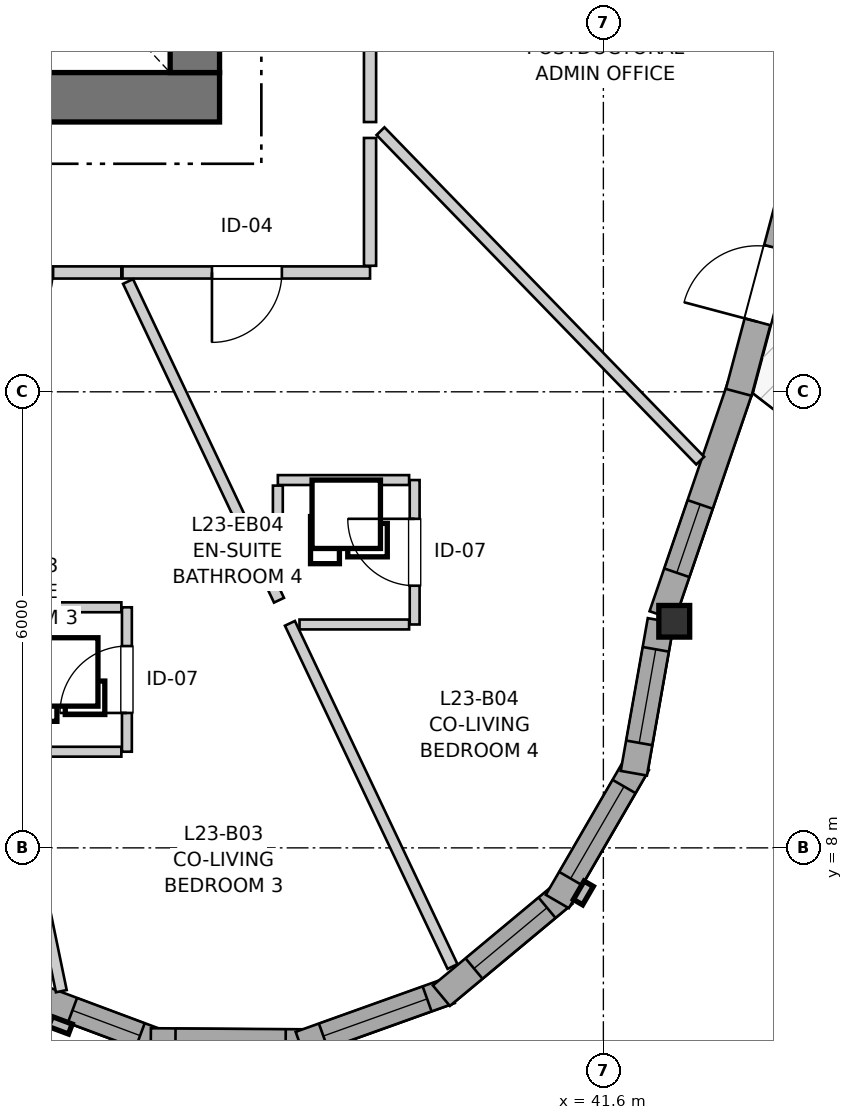
"""IFC4 building model, lengths in metres.
Left out: names, types, materials, properties, quantities, classifications, styles, units other than length and angle.
Written with IfcOpenShell. Run it as: python <this file> out.ifc"""

import sys

from ifc_helpers import new_model, si_unit, direction, frame, frame_2d, origin, origin_2d, place, context, subcontext, project, spatial, rectangle, i_section, extrude, source, transform, mapped, element, fill, save


model = new_model("IFC4")
c1 = context("Model", 3, precision=1e-05, world=origin(), true_north=direction((0.0, 1.0)))
c2 = subcontext(c1, "Body", "Model", "MODEL_VIEW")
j1 = project(units=[si_unit("LENGTHUNIT", "METRE"), si_unit("PLANEANGLEUNIT", "RADIAN")], contexts=[c1])
p1 = place(None, origin())
s1 = spatial("IfcSite", under=j1, at=p1, CompositionType="ELEMENT")
p2 = place(p1, origin())
s2 = spatial("IfcBuilding", under=s1, at=p2, CompositionType="ELEMENT")
p3 = place(p2, frame((0.0, 0.0, 80.0)))
s3 = spatial("IfcBuildingStorey", under=s2, at=p3, CompositionType="ELEMENT", Elevation=80.0)
p4 = place(p3, frame((24.15, 17.875, 0.0), z_axis=(0.0, 0.0, 1.0), x_axis=(1.0, 0.0, 0.0)))
e1 = element("IfcWall", 1, at=p4, inside=s3, PredefinedType="SHEAR", context=c2, shape_type="SweptSolid", body=[
    extrude(rectangle(XDim=12.4, YDim=0.65, at=frame_2d((6.2, 0.0))), origin(), (0.0, 0.0, 1.0), 2.935),
])
p5 = place(p3, frame((36.225, 18.2, 0.0), z_axis=(0.0, 0.0, 1.0), x_axis=(0.0, 1.0, 0.0)))
e2 = element("IfcWall", 2, at=p5, inside=s3, PredefinedType="SHEAR", context=c2, shape_type="SweptSolid", body=[
    extrude(rectangle(XDim=15.6, YDim=0.65, at=frame_2d((7.8, 0.0))), origin(), (0.0, 0.0, 1.0), 2.935),
])
p6 = place(p5, frame((4.25, 0.0, 0.0)))
e3 = element("IfcOpeningElement", 3, at=p6, cuts=e2, PredefinedType="OPENING", context=c2, shape_type="SweptSolid", body=[
    extrude(rectangle(XDim=1.1, YDim=2.15, at=frame_2d((0.55, 1.075))), frame((0.0, 0.335, 0.0), z_axis=(0.0, -1.0, 0.0), x_axis=(1.0, 0.0, 0.0)), (0.0, 0.0, 1.0), 0.67),
])
p7 = place(p5, frame((10.25, 0.0, 0.0)))
e4 = element("IfcOpeningElement", 4, at=p7, cuts=e2, PredefinedType="OPENING", context=c2, shape_type="SweptSolid", body=[
    extrude(rectangle(XDim=1.1, YDim=2.15, at=frame_2d((0.55, 1.075))), frame((0.0, 0.335, 0.0), z_axis=(0.0, -1.0, 0.0), x_axis=(1.0, 0.0, 0.0)), (0.0, 0.0, 1.0), 0.67),
])
m1 = source(origin(), c2, "Body", "SweptSolid", [
    extrude(i_section(OverallWidth=0.406, OverallDepth=0.416, WebThickness=0.027, FlangeThickness=0.044, FilletRadius=0.015, at=origin_2d()), origin(), (0.0, 0.0, 1.0), 2.935),
])
p8 = place(p3, frame((42.532, 10.981, 0.0), z_axis=(0.0, 0.0, 1.0), x_axis=(1.0, 0.0, 0.0)))
e5 = element("IfcColumn", 5, at=p8, inside=s3, PredefinedType="PILASTER", context=c2, shape_type="MappedRepresentation", body=[
    mapped(m1, transform((0.0, 0.0, 0.0), x_axis=(1.0, 0.0, 0.0), y_axis=(0.0, 1.0, 0.0), z_axis=(0.0, 0.0, 1.0), scale=1.0)),
])
p9 = place(p3, frame((34.059, 6.07, 0.0), z_axis=(0.0, 0.0, 1.0), x_axis=(0.936803747811, -0.349855310219, 0.0)))
e6 = element("IfcWall", 6, at=p9, inside=s3, PredefinedType="SOLIDWALL", context=c2, shape_type="SweptSolid", body=[
    extrude(rectangle(XDim=1.836, YDim=0.35, at=frame_2d((0.918, 0.0))), origin(), (0.0, 0.0, 1.0), 2.465),
])
p10 = place(p9, frame((0.593, 0.0, 0.82)))
e7 = element("IfcOpeningElement", 7, at=p10, cuts=e6, PredefinedType="OPENING", context=c2, shape_type="SweptSolid", body=[
    extrude(rectangle(XDim=0.95, YDim=1.35, at=frame_2d((0.475, 0.675))), frame((0.0, 0.185, 0.0), z_axis=(0.0, -1.0, 0.0), x_axis=(1.0, 0.0, 0.0)), (0.0, 0.0, 1.0), 0.37),
])
p11 = place(p3, frame((35.646, 5.452, 0.0), z_axis=(0.0, 0.0, 1.0), x_axis=(0.999976451414, -0.006862697526, 0.0)))
e8 = element("IfcWall", 8, at=p11, inside=s3, PredefinedType="SOLIDWALL", context=c2, shape_type="SweptSolid", body=[
    extrude(rectangle(XDim=2.099, YDim=0.35, at=frame_2d((1.049, 0.0))), origin(), (0.0, 0.0, 1.0), 2.465),
])
p12 = place(p11, frame((0.324, 0.0, 0.82)))
e9 = element("IfcOpeningElement", 9, at=p12, cuts=e8, PredefinedType="OPENING", context=c2, shape_type="SweptSolid", body=[
    extrude(rectangle(XDim=1.45, YDim=1.25, at=frame_2d((0.725, 0.625))), frame((0.0, 0.185, 0.0), z_axis=(0.0, -1.0, 0.0), x_axis=(1.0, 0.0, 0.0)), (0.0, 0.0, 1.0), 0.37),
])
p13 = place(p3, frame((37.61, 5.415, 0.0), z_axis=(0.0, 0.0, 1.0), x_axis=(0.941473186867, 0.33708787936, 0.0)))
e10 = element("IfcWall", 10, at=p13, inside=s3, PredefinedType="SOLIDWALL", context=c2, shape_type="SweptSolid", body=[
    extrude(rectangle(XDim=2.099, YDim=0.35, at=frame_2d((1.049, 0.0))), origin(), (0.0, 0.0, 1.0), 2.465),
])
p14 = place(p13, frame((0.324, 0.0, 0.82)))
e11 = element("IfcOpeningElement", 11, at=p14, cuts=e10, PredefinedType="OPENING", context=c2, shape_type="SweptSolid", body=[
    extrude(rectangle(XDim=1.45, YDim=1.25, at=frame_2d((0.725, 0.625))), frame((0.0, 0.185, 0.0), z_axis=(0.0, -1.0, 0.0), x_axis=(1.0, 0.0, 0.0)), (0.0, 0.0, 1.0), 0.37),
])
p15 = place(p3, frame((39.469, 6.055, 0.0), z_axis=(0.0, 0.0, 1.0), x_axis=(0.768497696041, 0.639852554249, 0.0)))
e12 = element("IfcWall", 12, at=p15, inside=s3, PredefinedType="SOLIDWALL", context=c2, shape_type="SweptSolid", body=[
    extrude(rectangle(XDim=2.099, YDim=0.35, at=frame_2d((1.049, 0.0))), origin(), (0.0, 0.0, 1.0), 2.465),
])
p16 = place(p15, frame((0.559, 0.0, 0.82)))
e13 = element("IfcOpeningElement", 13, at=p16, cuts=e12, PredefinedType="OPENING", context=c2, shape_type="SweptSolid", body=[
    extrude(rectangle(XDim=1.25, YDim=1.35, at=frame_2d((0.625, 0.675))), frame((0.0, 0.185, 0.0), z_axis=(0.0, -1.0, 0.0), x_axis=(1.0, 0.0, 0.0)), (0.0, 0.0, 1.0), 0.37),
])
p17 = place(p3, frame((40.994, 7.294, 0.0), z_axis=(0.0, 0.0, 1.0), x_axis=(0.501902596059, 0.864924149315, 0.0)))
e14 = element("IfcWall", 14, at=p17, inside=s3, PredefinedType="SOLIDWALL", context=c2, shape_type="SweptSolid", body=[
    extrude(rectangle(XDim=2.099, YDim=0.35, at=frame_2d((1.049, 0.0))), origin(), (0.0, 0.0, 1.0), 2.465),
])
p18 = place(p17, frame((0.35, 0.0, 0.82)))
e15 = element("IfcOpeningElement", 15, at=p18, cuts=e14, PredefinedType="OPENING", context=c2, shape_type="SweptSolid", body=[
    extrude(rectangle(XDim=1.4, YDim=1.35, at=frame_2d((0.7, 0.675))), frame((0.0, 0.185, 0.0), z_axis=(0.0, -1.0, 0.0), x_axis=(1.0, 0.0, 0.0)), (0.0, 0.0, 1.0), 0.37),
])
p19 = place(p3, frame((42.001, 8.982, 0.0), z_axis=(0.0, 0.0, 1.0), x_axis=(0.174419977077, 0.984671352075, 0.0)))
e16 = element("IfcWall", 16, at=p19, inside=s3, PredefinedType="SOLIDWALL", context=c2, shape_type="SweptSolid", body=[
    extrude(rectangle(XDim=2.041, YDim=0.35, at=frame_2d((1.021, 0.0))), origin(), (0.0, 0.0, 1.0), 2.465),
])
p20 = place(p19, frame((0.406, 0.0, 0.82)))
e17 = element("IfcOpeningElement", 17, at=p20, cuts=e16, PredefinedType="OPENING", context=c2, shape_type="SweptSolid", body=[
    extrude(rectangle(XDim=1.25, YDim=1.35, at=frame_2d((0.625, 0.675))), frame((0.0, 0.185, 0.0), z_axis=(0.0, -1.0, 0.0), x_axis=(1.0, 0.0, 0.0)), (0.0, 0.0, 1.0), 0.37),
])
p21 = place(p3, frame((42.373, 11.057, 0.0), z_axis=(0.0, 0.0, 1.0), x_axis=(0.323628226775, 0.946184321808, 0.0)))
e18 = element("IfcWall", 18, at=p21, inside=s3, PredefinedType="SOLIDWALL", context=c2, shape_type="SweptSolid", body=[
    extrude(rectangle(XDim=3.193, YDim=0.35, at=frame_2d((1.596, 0.0))), origin(), (0.0, 0.0, 1.0), 2.465),
])
p22 = place(p21, frame((0.595, 0.0, 0.82)))
e19 = element("IfcOpeningElement", 19, at=p22, cuts=e18, PredefinedType="OPENING", context=c2, shape_type="SweptSolid", body=[
    extrude(rectangle(XDim=0.95, YDim=1.35, at=frame_2d((0.475, 0.675))), frame((0.0, 0.185, 0.0), z_axis=(0.0, -1.0, 0.0), x_axis=(1.0, 0.0, 0.0)), (0.0, 0.0, 1.0), 0.37),
])
p23 = place(p3, frame((43.381, 13.993, 0.0), z_axis=(0.0, 0.0, 1.0), x_axis=(0.257079998736, 0.966390125286, 0.0)))
e20 = element("IfcWall", 20, at=p23, inside=s3, PredefinedType="SOLIDWALL", context=c2, shape_type="SweptSolid", body=[
    extrude(rectangle(XDim=2.921, YDim=0.35, at=frame_2d((1.46, 0.0))), origin(), (0.0, 0.0, 1.0), 2.465),
])
p24 = place(p23, frame((0.961, 0.0, 0.0)))
e21 = element("IfcOpeningElement", 21, at=p24, cuts=e20, PredefinedType="OPENING", context=c2, shape_type="SweptSolid", body=[
    extrude(rectangle(XDim=1.0, YDim=2.1, at=frame_2d((0.5, 1.05))), frame((0.0, 0.185, 0.0), z_axis=(0.0, -1.0, 0.0), x_axis=(1.0, 0.0, 0.0)), (0.0, 0.0, 1.0), 0.37),
])
p25 = place(p3, frame((38.53, 23.392, 0.0), z_axis=(0.0, 0.0, 1.0), x_axis=(0.0, -1.0, 0.0)))
e22 = element("IfcWall", 22, at=p25, inside=s3, PredefinedType="PARTITIONING", context=c2, shape_type="SweptSolid", body=[
    extrude(rectangle(XDim=5.843, YDim=0.16, at=frame_2d((2.921, 0.0))), origin(), (0.0, 0.0, 1.0), 2.935),
])
p26 = place(p25, frame((2.438, 0.0, 0.0)))
e23 = element("IfcOpeningElement", 23, at=p26, cuts=e22, PredefinedType="OPENING", context=c2, shape_type="SweptSolid", body=[
    extrude(rectangle(XDim=0.96, YDim=2.1, at=frame_2d((0.48, 1.05))), frame((0.0, 0.09, 0.0), z_axis=(0.0, -1.0, 0.0), x_axis=(1.0, 0.0, 0.0)), (0.0, 0.0, 1.0), 0.18),
])
p27 = place(p3, frame((38.53, 15.57, 0.0), z_axis=(0.0, 0.0, 1.0), x_axis=(-1.0, 0.0, 0.0)))
e24 = element("IfcWall", 24, at=p27, inside=s3, PredefinedType="PARTITIONING", context=c2, shape_type="SweptSolid", body=[
    extrude(rectangle(XDim=3.257, YDim=0.16, at=frame_2d((1.628, 0.0))), origin(), (0.0, 0.0, 1.0), 2.935),
])
p28 = place(p27, frame((1.16, 0.0, 0.0)))
e25 = element("IfcOpeningElement", 25, at=p28, cuts=e24, PredefinedType="OPENING", context=c2, shape_type="SweptSolid", body=[
    extrude(rectangle(XDim=0.92, YDim=2.1, at=frame_2d((0.46, 1.05))), frame((0.0, 0.09, 0.0), z_axis=(0.0, -1.0, 0.0), x_axis=(1.0, 0.0, 0.0)), (0.0, 0.0, 1.0), 0.18),
])
p29 = place(p3, frame((35.258, 15.57, 0.0), z_axis=(0.0, 0.0, 1.0), x_axis=(-1.0, 0.0, 0.0)))
e26 = element("IfcWall", 26, at=p29, inside=s3, PredefinedType="PARTITIONING", context=c2, shape_type="SweptSolid", body=[
    extrude(rectangle(XDim=2.718, YDim=0.16, at=frame_2d((1.359, 0.0))), origin(), (0.0, 0.0, 1.0), 2.935),
])
p30 = place(p29, frame((0.898, 0.0, 0.0)))
e27 = element("IfcOpeningElement", 27, at=p30, cuts=e26, PredefinedType="OPENING", context=c2, shape_type="SweptSolid", body=[
    extrude(rectangle(XDim=0.92, YDim=2.1, at=frame_2d((0.46, 1.05))), frame((0.0, 0.09, 0.0), z_axis=(0.0, -1.0, 0.0), x_axis=(1.0, 0.0, 0.0)), (0.0, 0.0, 1.0), 0.18),
])
p31 = place(p3, frame((39.117, 10.939, 0.0), z_axis=(0.0, 0.0, 1.0), x_axis=(0.0, 1.0, 0.0)))
e28 = element("IfcWall", 28, at=p31, inside=s3, PredefinedType="PARTITIONING", context=c2, shape_type="SweptSolid", body=[
    extrude(rectangle(XDim=1.9, YDim=0.13, at=frame_2d((0.95, 0.0))), origin(), (0.0, 0.0, 1.0), 2.935),
])
p32 = place(p31, frame((0.51, 0.0, 0.0)))
e29 = element("IfcOpeningElement", 29, at=p32, cuts=e28, PredefinedType="OPENING", context=c2, shape_type="SweptSolid", body=[
    extrude(rectangle(XDim=0.88, YDim=2.05, at=frame_2d((0.44, 1.025))), frame((0.0, 0.075, 0.0), z_axis=(0.0, -1.0, 0.0), x_axis=(1.0, 0.0, 0.0)), (0.0, 0.0, 1.0), 0.15),
])
p33 = place(p3, frame((35.331, 9.265, 0.0), z_axis=(0.0, 0.0, 1.0), x_axis=(0.0, 1.0, 0.0)))
e30 = element("IfcWall", 30, at=p33, inside=s3, PredefinedType="PARTITIONING", context=c2, shape_type="SweptSolid", body=[
    extrude(rectangle(XDim=1.9, YDim=0.13, at=frame_2d((0.95, 0.0))), origin(), (0.0, 0.0, 1.0), 2.935),
])
p34 = place(p33, frame((0.51, 0.0, 0.0)))
e31 = element("IfcOpeningElement", 31, at=p34, cuts=e30, PredefinedType="OPENING", context=c2, shape_type="SweptSolid", body=[
    extrude(rectangle(XDim=0.88, YDim=2.05, at=frame_2d((0.44, 1.025))), frame((0.0, 0.075, 0.0), z_axis=(0.0, -1.0, 0.0), x_axis=(1.0, 0.0, 0.0)), (0.0, 0.0, 1.0), 0.15),
])
p35 = place(p3, frame((38.667, 17.429, 0.0), z_axis=(0.0, 0.0, 1.0), x_axis=(0.696417222112, -0.717637131666, 0.0)))
e32 = element("IfcWall", 32, at=p35, inside=s3, PredefinedType="PARTITIONING", context=c2, shape_type="SweptSolid", body=[
    extrude(rectangle(XDim=6.04, YDim=0.145, at=frame_2d((3.02, 0.0))), origin(), (0.0, 0.0, 1.0), 2.935),
])
p36 = place(p3, frame((37.476, 10.954, 0.0), z_axis=(0.0, 0.0, 1.0), x_axis=(0.428094746621, -0.903733859007, 0.0)))
e33 = element("IfcWall", 33, at=p36, inside=s3, PredefinedType="PARTITIONING", context=c2, shape_type="SweptSolid", body=[
    extrude(rectangle(XDim=4.996, YDim=0.145, at=frame_2d((2.498, 0.0))), origin(), (0.0, 0.0, 1.0), 2.935),
])
p37 = place(p3, frame((35.346, 15.452, 0.0), z_axis=(0.0, 0.0, 1.0), x_axis=(0.428023015228, -0.903767834366, 0.0)))
e34 = element("IfcWall", 34, at=p37, inside=s3, PredefinedType="PARTITIONING", context=c2, shape_type="SweptSolid", body=[
    extrude(rectangle(XDim=4.64, YDim=0.145, at=frame_2d((2.32, 0.0))), origin(), (0.0, 0.0, 1.0), 2.935),
])
p38 = place(p3, frame((33.813, 9.28, 0.0), z_axis=(0.0, 0.0, 1.0), x_axis=(0.202648062782, -0.979251633979, 0.0)))
e35 = element("IfcWall", 35, at=p38, inside=s3, PredefinedType="PARTITIONING", context=c2, shape_type="SweptSolid", body=[
    extrude(rectangle(XDim=3.232, YDim=0.145, at=frame_2d((1.616, 0.0))), origin(), (0.0, 0.0, 1.0), 2.935),
])
p39 = place(p3, frame((38.53, 15.658, 0.0), z_axis=(0.0, 0.0, 1.0), x_axis=(0.0, 1.0, 0.0)))
e36 = element("IfcWall", 36, at=p39, inside=s3, PredefinedType="PARTITIONING", context=c2, shape_type="SweptSolid", body=[
    extrude(rectangle(XDim=1.682, YDim=0.16, at=frame_2d((0.841, 0.0))), origin(), (0.0, 0.0, 1.0), 2.935),
])
p40 = place(p3, frame((33.626, 11.165, 0.0), z_axis=(0.0, 0.0, 1.0), x_axis=(1.0, 0.0, 0.0)))
e37 = element("IfcWall", 37, at=p40, inside=s3, PredefinedType="PARTITIONING", context=c2, shape_type="SweptSolid", body=[
    extrude(rectangle(XDim=1.632, YDim=0.13, at=frame_2d((0.816, 0.0))), origin(), (0.0, 0.0, 1.0), 2.935),
])
p41 = place(p3, frame((37.317, 12.839, 0.0), z_axis=(0.0, 0.0, 1.0), x_axis=(1.0, 0.0, 0.0)))
e38 = element("IfcWall", 38, at=p41, inside=s3, PredefinedType="PARTITIONING", context=c2, shape_type="SweptSolid", body=[
    extrude(rectangle(XDim=1.727, YDim=0.13, at=frame_2d((0.864, 0.0))), origin(), (0.0, 0.0, 1.0), 2.935),
])
p42 = place(p3, frame((37.602, 10.939, 0.0), z_axis=(0.0, 0.0, 1.0), x_axis=(1.0, 0.0, 0.0)))
e39 = element("IfcWall", 39, at=p42, inside=s3, PredefinedType="PARTITIONING", context=c2, shape_type="SweptSolid", body=[
    extrude(rectangle(XDim=1.442, YDim=0.13, at=frame_2d((0.721, 0.0))), origin(), (0.0, 0.0, 1.0), 2.935),
])
p43 = place(p3, frame((37.317, 11.53, 0.0), z_axis=(0.0, 0.0, 1.0), x_axis=(0.0, 1.0, 0.0)))
e40 = element("IfcWall", 40, at=p43, inside=s3, PredefinedType="PARTITIONING", context=c2, shape_type="SweptSolid", body=[
    extrude(rectangle(XDim=1.236, YDim=0.13, at=frame_2d((0.618, 0.0))), origin(), (0.0, 0.0, 1.0), 2.935),
])
p44 = place(p3, frame((33.912, 9.265, 0.0), z_axis=(0.0, 0.0, 1.0), x_axis=(1.0, 0.0, 0.0)))
e41 = element("IfcWall", 41, at=p44, inside=s3, PredefinedType="PARTITIONING", context=c2, shape_type="SweptSolid", body=[
    extrude(rectangle(XDim=1.346, YDim=0.13, at=frame_2d((0.673, 0.0))), origin(), (0.0, 0.0, 1.0), 2.935),
])
m2 = source(origin(), c2, "Body", "SweptSolid", [
    extrude(rectangle(XDim=0.95, YDim=1.35, at=frame_2d((0.475, 0.675))), frame((0.0, 0.03, 0.0), z_axis=(0.0, -1.0, 0.0), x_axis=(1.0, 0.0, 0.0)), (0.0, 0.0, 1.0), 0.06),
])
p45 = place(p10, origin())
e42 = element("IfcWindow", 42, at=p45, inside=s3, PartitioningType="SINGLE_PANEL", PredefinedType="WINDOW", context=c2, shape_type="MappedRepresentation", body=[
    mapped(m2, transform((0.0, 0.0, 0.0), x_axis=(1.0, 0.0, 0.0), y_axis=(0.0, 1.0, 0.0), z_axis=(0.0, 0.0, 1.0), scale=1.0)),
])
fill(e7, e42)
m3 = source(origin(), c2, "Body", "SweptSolid", [
    extrude(rectangle(XDim=1.45, YDim=1.25, at=frame_2d((0.725, 0.625))), frame((0.0, 0.03, 0.0), z_axis=(0.0, -1.0, 0.0), x_axis=(1.0, 0.0, 0.0)), (0.0, 0.0, 1.0), 0.06),
])
p46 = place(p12, origin())
e43 = element("IfcWindow", 43, at=p46, inside=s3, PartitioningType="SINGLE_PANEL", PredefinedType="WINDOW", context=c2, shape_type="MappedRepresentation", body=[
    mapped(m3, transform((0.0, 0.0, 0.0), x_axis=(1.0, 0.0, 0.0), y_axis=(0.0, 1.0, 0.0), z_axis=(0.0, 0.0, 1.0), scale=1.0)),
])
fill(e9, e43)
p47 = place(p14, origin())
e44 = element("IfcWindow", 44, at=p47, inside=s3, PartitioningType="SINGLE_PANEL", PredefinedType="WINDOW", context=c2, shape_type="MappedRepresentation", body=[
    mapped(m3, transform((0.0, 0.0, 0.0), x_axis=(1.0, 0.0, 0.0), y_axis=(0.0, 1.0, 0.0), z_axis=(0.0, 0.0, 1.0), scale=1.0)),
])
fill(e11, e44)
m4 = source(origin(), c2, "Body", "SweptSolid", [
    extrude(rectangle(XDim=1.25, YDim=1.35, at=frame_2d((0.625, 0.675))), frame((0.0, 0.03, 0.0), z_axis=(0.0, -1.0, 0.0), x_axis=(1.0, 0.0, 0.0)), (0.0, 0.0, 1.0), 0.06),
])
p48 = place(p16, origin())
e45 = element("IfcWindow", 45, at=p48, inside=s3, PartitioningType="SINGLE_PANEL", PredefinedType="WINDOW", context=c2, shape_type="MappedRepresentation", body=[
    mapped(m4, transform((0.0, 0.0, 0.0), x_axis=(1.0, 0.0, 0.0), y_axis=(0.0, 1.0, 0.0), z_axis=(0.0, 0.0, 1.0), scale=1.0)),
])
fill(e13, e45)
m5 = source(origin(), c2, "Body", "SweptSolid", [
    extrude(rectangle(XDim=1.4, YDim=1.35, at=frame_2d((0.7, 0.675))), frame((0.0, 0.03, 0.0), z_axis=(0.0, -1.0, 0.0), x_axis=(1.0, 0.0, 0.0)), (0.0, 0.0, 1.0), 0.06),
])
p49 = place(p18, origin())
e46 = element("IfcWindow", 46, at=p49, inside=s3, PartitioningType="SINGLE_PANEL", PredefinedType="WINDOW", context=c2, shape_type="MappedRepresentation", body=[
    mapped(m5, transform((0.0, 0.0, 0.0), x_axis=(1.0, 0.0, 0.0), y_axis=(0.0, 1.0, 0.0), z_axis=(0.0, 0.0, 1.0), scale=1.0)),
])
fill(e15, e46)
p50 = place(p20, origin())
e47 = element("IfcWindow", 47, at=p50, inside=s3, PartitioningType="SINGLE_PANEL", PredefinedType="WINDOW", context=c2, shape_type="MappedRepresentation", body=[
    mapped(m4, transform((0.0, 0.0, 0.0), x_axis=(1.0, 0.0, 0.0), y_axis=(0.0, 1.0, 0.0), z_axis=(0.0, 0.0, 1.0), scale=1.0)),
])
fill(e17, e47)
p51 = place(p22, origin())
e48 = element("IfcWindow", 48, at=p51, inside=s3, PartitioningType="SINGLE_PANEL", PredefinedType="WINDOW", context=c2, shape_type="MappedRepresentation", body=[
    mapped(m2, transform((0.0, 0.0, 0.0), x_axis=(1.0, 0.0, 0.0), y_axis=(0.0, 1.0, 0.0), z_axis=(0.0, 0.0, 1.0), scale=1.0)),
])
fill(e19, e48)
m6 = source(origin(), c2, "Body", "SweptSolid", [
    extrude(rectangle(XDim=1.0, YDim=2.1, at=frame_2d((0.5, 1.05))), frame((0.0, 0.025, 0.0), z_axis=(0.0, -1.0, 0.0), x_axis=(1.0, 0.0, 0.0)), (0.0, 0.0, 1.0), 0.05),
])
p52 = place(p24, origin())
e49 = element("IfcDoor", 49, at=p52, inside=s3, OperationType="SINGLE_SWING_LEFT", PredefinedType="DOOR", context=c2, shape_type="MappedRepresentation", body=[
    mapped(m6, transform((0.0, 0.0, 0.0), x_axis=(1.0, 0.0, 0.0), y_axis=(0.0, 1.0, 0.0), z_axis=(0.0, 0.0, 1.0), scale=1.0)),
])
fill(e21, e49)
m7 = source(origin(), c2, "Body", "SweptSolid", [
    extrude(rectangle(XDim=0.92, YDim=2.1, at=frame_2d((0.46, 1.05))), frame((0.0, 0.025, 0.0), z_axis=(0.0, -1.0, 0.0), x_axis=(1.0, 0.0, 0.0)), (0.0, 0.0, 1.0), 0.05),
])
p53 = place(p28, origin())
e50 = element("IfcDoor", 50, at=p53, inside=s3, OperationType="SINGLE_SWING_RIGHT", PredefinedType="DOOR", context=c2, shape_type="MappedRepresentation", body=[
    mapped(m7, transform((0.0, 0.0, 0.0), x_axis=(1.0, 0.0, 0.0), y_axis=(0.0, 1.0, 0.0), z_axis=(0.0, 0.0, 1.0), scale=1.0)),
])
fill(e25, e50)
p54 = place(p30, origin())
e51 = element("IfcDoor", 51, at=p54, inside=s3, OperationType="SINGLE_SWING_RIGHT", PredefinedType="DOOR", context=c2, shape_type="MappedRepresentation", body=[
    mapped(m7, transform((0.0, 0.0, 0.0), x_axis=(1.0, 0.0, 0.0), y_axis=(0.0, 1.0, 0.0), z_axis=(0.0, 0.0, 1.0), scale=1.0)),
])
fill(e27, e51)
m8 = source(origin(), c2, "Body", "SweptSolid", [
    extrude(rectangle(XDim=0.88, YDim=2.05, at=frame_2d((0.44, 1.025))), frame((0.0, 0.025, 0.0), z_axis=(0.0, -1.0, 0.0), x_axis=(1.0, 0.0, 0.0)), (0.0, 0.0, 1.0), 0.05),
])
p55 = place(p32, origin())
e52 = element("IfcDoor", 52, at=p55, inside=s3, OperationType="SINGLE_SWING_RIGHT", PredefinedType="DOOR", context=c2, shape_type="MappedRepresentation", body=[
    mapped(m8, transform((0.0, 0.0, 0.0), x_axis=(1.0, 0.0, 0.0), y_axis=(0.0, 1.0, 0.0), z_axis=(0.0, 0.0, 1.0), scale=1.0)),
])
fill(e29, e52)
p56 = place(p34, origin())
e53 = element("IfcDoor", 53, at=p56, inside=s3, OperationType="SINGLE_SWING_LEFT", PredefinedType="DOOR", context=c2, shape_type="MappedRepresentation", body=[
    mapped(m8, transform((0.0, 0.0, 0.0), x_axis=(1.0, 0.0, 0.0), y_axis=(0.0, 1.0, 0.0), z_axis=(0.0, 0.0, 1.0), scale=1.0)),
])
fill(e31, e53)
save(model, sys.argv[1])
